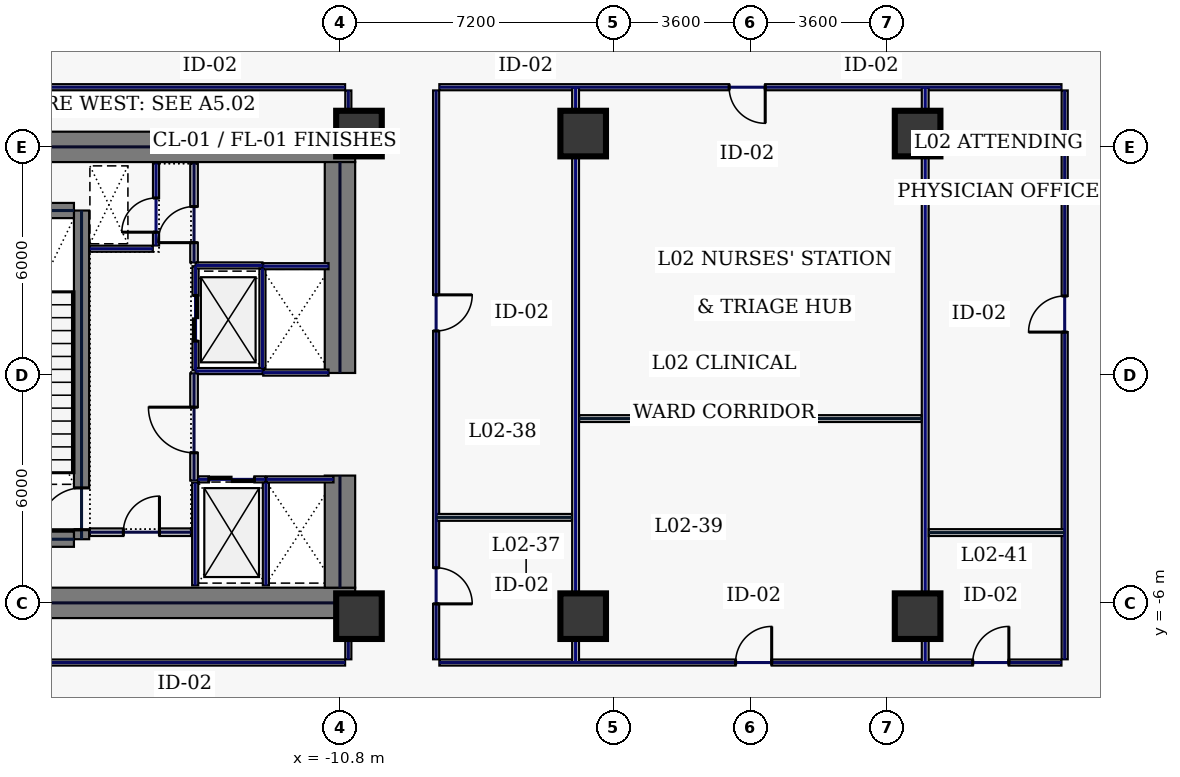
"""IFC4 building model, lengths in metres.
Left out: names, types, materials, properties, quantities, classifications, styles, units other than length and angle.
Written with IfcOpenShell. Run it as: python <this file> out.ifc"""

import sys

from ifc_helpers import new_model, si_unit, direction, frame, frame_2d, origin, origin_2d, place, context, subcontext, project, spatial, rectangle, hollow_rectangle, extrude, element, fill, save


model = new_model("IFC4")
c1 = context("Model", 3, precision=1e-05, world=origin(), true_north=direction((0.0, 1.0)))
c2 = subcontext(c1, "Body", "Model", "MODEL_VIEW")
j1 = project(units=[si_unit("LENGTHUNIT", "METRE"), si_unit("PLANEANGLEUNIT", "RADIAN")], contexts=[c1])
p1 = place(None, origin())
s1 = spatial("IfcSite", under=j1, at=p1, CompositionType="ELEMENT")
p2 = place(p1, origin())
s2 = spatial("IfcBuilding", under=s1, at=p2, CompositionType="ELEMENT")
p3 = place(p2, frame((0.0, 0.0, 13.4)))
s3 = spatial("IfcBuildingStorey", under=s2, at=p3, CompositionType="ELEMENT", Elevation=13.4)
for number, where, z_axis, x_axis in (
    (1, (-22.0, 6.0, 0.0), (0.0, 0.0, 1.0), (1.0, 0.0, 0.0)),
    (2, (-22.0, -6.0, 0.0), (0.0, 0.0, 1.0), (1.0, 0.0, 0.0)),
):
    element("IfcWall", number, at=place(p3, frame(where, z_axis=z_axis, x_axis=x_axis)), inside=s3, PredefinedType="SHEAR", context=c2, shape_type="SweptSolid", body=[
        extrude(rectangle(XDim=11.6, YDim=0.8, at=frame_2d((5.8, 0.0))), origin(), (0.0, 0.0, 1.0), 4.7),
    ])
p4 = place(p3, frame((-10.8, -5.6, 0.0), z_axis=(0.0, 0.0, 1.0), x_axis=(0.0, 1.0, 0.0)))
e3 = element("IfcWall", 3, at=p4, inside=s3, PredefinedType="SHEAR", context=c2, shape_type="SweptSolid", body=[
    extrude(rectangle(XDim=2.95, YDim=0.8, at=frame_2d((1.475, 0.0))), origin(), (0.0, 0.0, 1.0), 4.7),
])
p5 = place(p3, frame((-10.8, 0.05, 0.0), z_axis=(0.0, 0.0, 1.0), x_axis=(0.0, 1.0, 0.0)))
e4 = element("IfcWall", 4, at=p5, inside=s3, PredefinedType="SHEAR", context=c2, shape_type="SweptSolid", body=[
    extrude(rectangle(XDim=5.55, YDim=0.8, at=frame_2d((2.775, 0.0))), origin(), (0.0, 0.0, 1.0), 4.7),
])
p6 = place(p3, frame((-17.6, -4.325, 0.0), z_axis=(0.0, 0.0, 1.0), x_axis=(0.0, 1.0, 0.0)))
e5 = element("IfcWall", 5, at=p6, inside=s3, PredefinedType="SHEAR", context=c2, shape_type="SweptSolid", body=[
    extrude(rectangle(XDim=8.65, YDim=0.4, at=frame_2d((4.325, 0.0))), origin(), (0.0, 0.0, 1.0), 4.7),
])
p7 = place(p6, frame((0.25, 0.0, 0.0)))
e6 = element("IfcOpeningElement", 6, at=p7, cuts=e5, PredefinedType="OPENING", context=c2, shape_type="SweptSolid", body=[
    extrude(rectangle(XDim=1.1, YDim=2.2, at=frame_2d((0.55, 1.1))), frame((0.0, 0.21, 0.0), z_axis=(0.0, -1.0, 0.0), x_axis=(1.0, 0.0, 0.0)), (0.0, 0.0, 1.0), 0.42),
])
for number, where, z_axis, x_axis in (
    (7, (-21.2, -4.325, 0.0), (0.0, 0.0, 1.0), (1.0, 0.0, 0.0)),
    (8, (-21.2, 4.325, 0.0), (0.0, 0.0, 1.0), (1.0, 0.0, 0.0)),
):
    element("IfcWall", number, at=place(p3, frame(where, z_axis=z_axis, x_axis=x_axis)), inside=s3, PredefinedType="SHEAR", context=c2, shape_type="SweptSolid", body=[
        extrude(rectangle(XDim=3.4, YDim=0.4, at=frame_2d((1.7, 0.0))), origin(), (0.0, 0.0, 1.0), 4.7),
    ])
for number, where, z_axis, x_axis in (
    (9, (-10.3, -6.35, 0.0), (0.0, 0.0, 1.0), (1.0, 0.0, 0.0)),
    (10, (-10.3, 6.35, 0.0), (0.0, 0.0, 1.0), (1.0, 0.0, 0.0)),
    (11, (-4.4, -6.35, 0.0), (0.0, 0.0, 1.0), (1.0, 0.0, 0.0)),
    (12, (4.4, -6.35, 0.0), (0.0, 0.0, 1.0), (1.0, 0.0, 0.0)),
    (13, (-4.4, 6.35, 0.0), (0.0, 0.0, 1.0), (1.0, 0.0, 0.0)),
    (14, (4.4, 6.35, 0.0), (0.0, 0.0, 1.0), (1.0, 0.0, 0.0)),
):
    element("IfcColumn", number, at=place(p3, frame(where, z_axis=z_axis, x_axis=x_axis)), inside=s3, PredefinedType="COLUMN", context=c2, shape_type="SweptSolid", body=[
        extrude(hollow_rectangle(XDim=1.2, YDim=1.2, WallThickness=0.05, at=origin_2d()), origin(), (0.0, 0.0, 1.0), 4.7),
    ])
p8 = place(p3, frame((-14.6, 0.12, 0.0), z_axis=(0.0, 0.0, 1.0), x_axis=(0.0, 1.0, 0.0)))
e15 = element("IfcWall", 15, at=p8, inside=s3, PredefinedType="PARTITIONING", context=c2, shape_type="SweptSolid", body=[
    extrude(rectangle(XDim=2.74, YDim=0.16, at=frame_2d((1.37, 0.0))), origin(), (0.0, 0.0, 1.0), 4.7),
])
p9 = place(p8, frame((0.77, 0.0, 0.0)))
e16 = element("IfcOpeningElement", 16, at=p9, cuts=e15, PredefinedType="OPENING", context=c2, shape_type="SweptSolid", body=[
    extrude(rectangle(XDim=1.2, YDim=2.2, at=frame_2d((0.6, 1.1))), frame((0.0, 0.09, 0.0), z_axis=(0.0, -1.0, 0.0), x_axis=(1.0, 0.0, 0.0)), (0.0, 0.0, 1.0), 0.18),
])
for number, where, z_axis, x_axis in (
    (17, (-14.6, 0.1, 0.0), (0.0, 0.0, 1.0), (1.0, 0.0, 0.0)),
    (18, (-14.6, 2.88, 0.0), (0.0, 0.0, 1.0), (1.0, 0.0, 0.0)),
):
    element("IfcWall", number, at=place(p3, frame(where, z_axis=z_axis, x_axis=x_axis)), inside=s3, PredefinedType="PARTITIONING", context=c2, shape_type="SweptSolid", body=[
        extrude(rectangle(XDim=1.76, YDim=0.16, at=frame_2d((0.88, 0.0))), origin(), (0.0, 0.0, 1.0), 4.7),
    ])
p10 = place(p3, frame((-12.84, 0.18, 0.0), z_axis=(0.0, 0.0, 1.0), x_axis=(0.0, 1.0, 0.0)))
e19 = element("IfcWall", 19, at=p10, inside=s3, PredefinedType="PARTITIONING", context=c2, shape_type="SweptSolid", body=[
    extrude(rectangle(XDim=2.62, YDim=0.16, at=frame_2d((1.31, 0.0))), origin(), (0.0, 0.0, 1.0), 4.7),
])
p11 = place(p3, frame((-14.53, -2.75, 0.0), z_axis=(0.0, 0.0, 1.0), x_axis=(1.0, 0.0, 0.0)))
e20 = element("IfcWall", 20, at=p11, inside=s3, PredefinedType="PARTITIONING", context=c2, shape_type="SweptSolid", body=[
    extrude(rectangle(XDim=1.76, YDim=0.16, at=frame_2d((0.88, 0.0))), origin(), (0.0, 0.0, 1.0), 4.7),
])
p12 = place(p11, frame((0.28, 0.0, 0.0)))
e21 = element("IfcOpeningElement", 21, at=p12, cuts=e20, PredefinedType="OPENING", context=c2, shape_type="SweptSolid", body=[
    extrude(rectangle(XDim=1.2, YDim=2.2, at=frame_2d((0.6, 1.1))), frame((0.0, 0.09, 0.0), z_axis=(0.0, -1.0, 0.0), x_axis=(1.0, 0.0, 0.0)), (0.0, 0.0, 1.0), 0.18),
])
for number, where, z_axis, x_axis in (
    (22, (-12.75, -5.54, 0.0), (0.0, 0.0, 1.0), (0.0, 1.0, 0.0)),
    (23, (-14.61, -5.54, 0.0), (0.0, 0.0, 1.0), (0.0, 1.0, 0.0)),
):
    element("IfcWall", number, at=place(p3, frame(where, z_axis=z_axis, x_axis=x_axis)), inside=s3, PredefinedType="PARTITIONING", context=c2, shape_type="SweptSolid", body=[
        extrude(rectangle(XDim=2.7, YDim=0.16, at=frame_2d((1.35, 0.0))), origin(), (0.0, 0.0, 1.0), 4.7),
    ])
p13 = place(p3, frame((-12.73, -2.75, 0.0), z_axis=(0.0, 0.0, 1.0), x_axis=(1.0, 0.0, 0.0)))
e24 = element("IfcWall", 24, at=p13, inside=s3, PredefinedType="PARTITIONING", context=c2, shape_type="SweptSolid", body=[
    extrude(rectangle(XDim=1.76, YDim=0.16, at=frame_2d((0.88, 0.0))), origin(), (0.0, 0.0, 1.0), 4.7),
])
for number, where, z_axis, x_axis in (
    (25, (-12.82, 0.06, 0.0), (0.0, 0.0, 1.0), (1.0, 0.0, 0.0)),
    (26, (-12.82, 2.86, 0.0), (0.0, 0.0, 1.0), (1.0, 0.0, 0.0)),
):
    element("IfcWall", number, at=place(p3, frame(where, z_axis=z_axis, x_axis=x_axis)), inside=s3, PredefinedType="PARTITIONING", context=c2, shape_type="SweptSolid", body=[
        extrude(rectangle(XDim=1.72, YDim=0.16, at=frame_2d((0.86, 0.0))), origin(), (0.0, 0.0, 1.0), 4.7),
    ])
p14 = place(p3, frame((-15.64, 3.405, 0.0), z_axis=(0.0, 0.0, 1.0), x_axis=(0.0, 1.0, 0.0)))
e27 = element("IfcWall", 27, at=p14, inside=s3, PredefinedType="PARTITIONING", context=c2, shape_type="SweptSolid", body=[
    extrude(rectangle(XDim=2.155, YDim=0.16, at=frame_2d((1.078, 0.0))), origin(), (0.0, 0.0, 1.0), 4.7),
])
p15 = place(p14, frame((0.35, 0.0, 0.0)))
e28 = element("IfcOpeningElement", 28, at=p15, cuts=e27, PredefinedType="OPENING", context=c2, shape_type="SweptSolid", body=[
    extrude(rectangle(XDim=0.9, YDim=2.2, at=frame_2d((0.45, 1.1))), frame((0.0, 0.09, 0.0), z_axis=(0.0, -1.0, 0.0), x_axis=(1.0, 0.0, 0.0)), (0.0, 0.0, 1.0), 0.18),
])
p16 = place(p3, frame((-17.38, 3.32, 0.0), z_axis=(0.0, 0.0, 1.0), x_axis=(1.0, 0.0, 0.0)))
e29 = element("IfcWall", 29, at=p16, inside=s3, PredefinedType="PARTITIONING", context=c2, shape_type="SweptSolid", body=[
    extrude(rectangle(XDim=1.655, YDim=0.16, at=frame_2d((0.827, 0.0))), origin(), (0.0, 0.0, 1.0), 4.7),
])
p17 = place(p3, frame((-17.38, -4.14, 0.0), z_axis=(0.0, 0.0, 1.0), x_axis=(1.0, 0.0, 0.0)))
e30 = element("IfcWall", 30, at=p17, inside=s3, PredefinedType="SOLIDWALL", context=c2, shape_type="SweptSolid", body=[
    extrude(rectangle(XDim=2.66, YDim=0.2, at=frame_2d((1.33, 0.0))), origin(), (0.0, 0.0, 1.0), 4.7),
])
p18 = place(p17, frame((0.88, 0.0, 0.0)))
e31 = element("IfcOpeningElement", 31, at=p18, cuts=e30, PredefinedType="OPENING", context=c2, shape_type="SweptSolid", body=[
    extrude(rectangle(XDim=0.95, YDim=2.2, at=frame_2d((0.475, 1.1))), frame((0.0, 0.11, 0.0), z_axis=(0.0, -1.0, 0.0), x_axis=(1.0, 0.0, 0.0)), (0.0, 0.0, 1.0), 0.22),
])
p19 = place(p3, frame((-14.64, 2.96, 0.0), z_axis=(0.0, 0.0, 1.0), x_axis=(0.0, 1.0, 0.0)))
e32 = element("IfcWall", 32, at=p19, inside=s3, PredefinedType="SOLIDWALL", context=c2, shape_type="SweptSolid", body=[
    extrude(rectangle(XDim=2.6, YDim=0.2, at=frame_2d((1.3, 0.0))), origin(), (0.0, 0.0, 1.0), 4.7),
])
p20 = place(p19, frame((0.52, 0.0, 0.0)))
e33 = element("IfcOpeningElement", 33, at=p20, cuts=e32, PredefinedType="OPENING", context=c2, shape_type="SweptSolid", body=[
    extrude(rectangle(XDim=0.95, YDim=2.2, at=frame_2d((0.475, 1.1))), frame((0.0, 0.11, 0.0), z_axis=(0.0, -1.0, 0.0), x_axis=(1.0, 0.0, 0.0)), (0.0, 0.0, 1.0), 0.22),
])
p21 = place(p3, frame((-14.64, -2.78, 0.0), z_axis=(0.0, 0.0, 1.0), x_axis=(0.0, 1.0, 0.0)))
e34 = element("IfcWall", 34, at=p21, inside=s3, PredefinedType="SOLIDWALL", context=c2, shape_type="SweptSolid", body=[
    extrude(rectangle(XDim=2.82, YDim=0.2, at=frame_2d((1.41, 0.0))), origin(), (0.0, 0.0, 1.0), 4.7),
])
p22 = place(p21, frame((0.73, 0.0, 0.0)))
e35 = element("IfcOpeningElement", 35, at=p22, cuts=e34, PredefinedType="OPENING", context=c2, shape_type="SweptSolid", body=[
    extrude(rectangle(XDim=1.2, YDim=2.2, at=frame_2d((0.6, 1.1))), frame((0.0, 0.11, 0.0), z_axis=(0.0, -1.0, 0.0), x_axis=(1.0, 0.0, 0.0)), (0.0, 0.0, 1.0), 0.22),
])
p23 = place(p3, frame((8.185, 7.57, 0.0), z_axis=(0.0, 0.0, 1.0), x_axis=(-1.0, 0.0, 0.0)))
e36 = element("IfcWall", 36, at=p23, inside=s3, PredefinedType="PARTITIONING", context=c2, shape_type="SweptSolid", body=[
    extrude(rectangle(XDim=16.37, YDim=0.16, at=frame_2d((8.185, 0.0))), origin(), (0.0, 0.0, 1.0), 4.7),
])
p24 = place(p23, frame((7.795, 0.0, 0.0)))
e37 = element("IfcOpeningElement", 37, at=p24, cuts=e36, PredefinedType="OPENING", context=c2, shape_type="SweptSolid", body=[
    extrude(rectangle(XDim=0.95, YDim=2.2, at=frame_2d((0.475, 1.1))), frame((0.0, 0.09, 0.0), z_axis=(0.0, -1.0, 0.0), x_axis=(1.0, 0.0, 0.0)), (0.0, 0.0, 1.0), 0.18),
])
p25 = place(p3, frame((-8.27, 7.485, 0.0), z_axis=(0.0, 0.0, 1.0), x_axis=(0.0, -1.0, 0.0)))
e38 = element("IfcWall", 38, at=p25, inside=s3, PredefinedType="PARTITIONING", context=c2, shape_type="SweptSolid", body=[
    extrude(rectangle(XDim=14.97, YDim=0.16, at=frame_2d((7.485, 0.0))), origin(), (0.0, 0.0, 1.0), 4.7),
])
p26 = place(p25, frame((12.561, 0.0, 0.0)))
e39 = element("IfcOpeningElement", 39, at=p26, cuts=e38, PredefinedType="OPENING", context=c2, shape_type="SweptSolid", body=[
    extrude(rectangle(XDim=0.95, YDim=2.2, at=frame_2d((0.475, 1.1))), frame((0.0, 0.09, 0.0), z_axis=(0.0, -1.0, 0.0), x_axis=(1.0, 0.0, 0.0)), (0.0, 0.0, 1.0), 0.18),
])
p27 = place(p25, frame((5.379, 0.0, 0.0)))
e40 = element("IfcOpeningElement", 40, at=p27, cuts=e38, PredefinedType="OPENING", context=c2, shape_type="SweptSolid", body=[
    extrude(rectangle(XDim=0.95, YDim=2.2, at=frame_2d((0.475, 1.1))), frame((0.0, 0.09, 0.0), z_axis=(0.0, -1.0, 0.0), x_axis=(1.0, 0.0, 0.0)), (0.0, 0.0, 1.0), 0.18),
])
p28 = place(p3, frame((-8.185, -7.57, 0.0), z_axis=(0.0, 0.0, 1.0), x_axis=(1.0, 0.0, 0.0)))
e41 = element("IfcWall", 41, at=p28, inside=s3, PredefinedType="PARTITIONING", context=c2, shape_type="SweptSolid", body=[
    extrude(rectangle(XDim=16.37, YDim=0.16, at=frame_2d((8.185, 0.0))), origin(), (0.0, 0.0, 1.0), 4.7),
])
p29 = place(p28, frame((7.795, 0.0, 0.0)))
e42 = element("IfcOpeningElement", 42, at=p29, cuts=e41, PredefinedType="OPENING", context=c2, shape_type="SweptSolid", body=[
    extrude(rectangle(XDim=0.95, YDim=2.2, at=frame_2d((0.475, 1.1))), frame((0.0, 0.09, 0.0), z_axis=(0.0, -1.0, 0.0), x_axis=(1.0, 0.0, 0.0)), (0.0, 0.0, 1.0), 0.18),
])
p30 = place(p28, frame((14.036, 0.0, 0.0)))
e43 = element("IfcOpeningElement", 43, at=p30, cuts=e41, PredefinedType="OPENING", context=c2, shape_type="SweptSolid", body=[
    extrude(rectangle(XDim=0.95, YDim=2.2, at=frame_2d((0.475, 1.1))), frame((0.0, 0.09, 0.0), z_axis=(0.0, -1.0, 0.0), x_axis=(1.0, 0.0, 0.0)), (0.0, 0.0, 1.0), 0.18),
])
p31 = place(p3, frame((8.27, -7.485, 0.0), z_axis=(0.0, 0.0, 1.0), x_axis=(0.0, 1.0, 0.0)))
e44 = element("IfcWall", 44, at=p31, inside=s3, PredefinedType="PARTITIONING", context=c2, shape_type="SweptSolid", body=[
    extrude(rectangle(XDim=14.97, YDim=0.16, at=frame_2d((7.485, 0.0))), origin(), (0.0, 0.0, 1.0), 4.7),
])
p32 = place(p31, frame((8.611, 0.0, 0.0)))
e45 = element("IfcOpeningElement", 45, at=p32, cuts=e44, PredefinedType="OPENING", context=c2, shape_type="SweptSolid", body=[
    extrude(rectangle(XDim=0.95, YDim=2.2, at=frame_2d((0.475, 1.1))), frame((0.0, 0.09, 0.0), z_axis=(0.0, -1.0, 0.0), x_axis=(1.0, 0.0, 0.0)), (0.0, 0.0, 1.0), 0.18),
])
for number, where, z_axis, x_axis in (
    (46, (-10.58, -7.485, 0.0), (0.0, 0.0, 1.0), (0.0, 1.0, 0.0)),
    (47, (-10.58, 6.42, 0.0), (0.0, 0.0, 1.0), (0.0, 1.0, 0.0)),
):
    element("IfcWall", number, at=place(p3, frame(where, z_axis=z_axis, x_axis=x_axis)), inside=s3, PredefinedType="PARTITIONING", context=c2, shape_type="SweptSolid", body=[
        extrude(rectangle(XDim=1.065, YDim=0.16, at=frame_2d((0.533, 0.0))), origin(), (0.0, 0.0, 1.0), 4.7),
    ])
for number, where, z_axis, x_axis in (
    (48, (-10.665, 7.57, 0.0), (0.0, 0.0, 1.0), (-1.0, 0.0, 0.0)),
    (49, (-27.185, -7.57, 0.0), (0.0, 0.0, 1.0), (1.0, 0.0, 0.0)),
):
    element("IfcWall", number, at=place(p3, frame(where, z_axis=z_axis, x_axis=x_axis)), inside=s3, PredefinedType="PARTITIONING", context=c2, shape_type="SweptSolid", body=[
        extrude(rectangle(XDim=16.52, YDim=0.16, at=frame_2d((8.26, 0.0))), origin(), (0.0, 0.0, 1.0), 4.7),
    ])
for number, where, z_axis, x_axis in (
    (50, (-4.6, -7.565, 0.0), (0.0, 0.0, 1.0), (0.0, 1.0, 0.0)),
    (51, (4.6, -7.565, 0.0), (0.0, 0.0, 1.0), (0.0, 1.0, 0.0)),
):
    element("IfcWall", number, at=place(p3, frame(where, z_axis=z_axis, x_axis=x_axis)), inside=s3, PredefinedType="PARTITIONING", context=c2, shape_type="SweptSolid", body=[
        extrude(rectangle(XDim=15.13, YDim=0.18, at=frame_2d((7.565, 0.0))), origin(), (0.0, 0.0, 1.0), 3.895),
    ])
p33 = place(p3, frame((-4.505, -1.15, 0.0), z_axis=(0.0, 0.0, 1.0), x_axis=(1.0, 0.0, 0.0)))
e52 = element("IfcWall", 52, at=p33, inside=s3, PredefinedType="PARTITIONING", context=c2, shape_type="SweptSolid", body=[
    extrude(rectangle(XDim=9.01, YDim=0.18, at=frame_2d((4.505, 0.0))), origin(), (0.0, 0.0, 1.0), 4.7),
])
for number, where, z_axis, x_axis in (
    (53, (-8.265, -3.75, 0.0), (0.0, 0.0, 1.0), (1.0, 0.0, 0.0)),
    (54, (4.695, -4.15, 0.0), (0.0, 0.0, 1.0), (1.0, 0.0, 0.0)),
):
    element("IfcWall", number, at=place(p3, frame(where, z_axis=z_axis, x_axis=x_axis)), inside=s3, PredefinedType="PARTITIONING", context=c2, shape_type="SweptSolid", body=[
        extrude(rectangle(XDim=3.57, YDim=0.18, at=frame_2d((1.785, 0.0))), origin(), (0.0, 0.0, 1.0), 4.7),
    ])
p34 = place(p7, origin())
e55 = element("IfcDoor", 55, at=p34, inside=s3, OperationType="SINGLE_SWING_LEFT", PredefinedType="DOOR", context=c2, shape_type="SweptSolid", body=[
    extrude(rectangle(XDim=1.1, YDim=2.2, at=frame_2d((0.55, 1.1))), frame((0.0, 0.025, 0.0), z_axis=(0.0, -1.0, 0.0), x_axis=(1.0, 0.0, 0.0)), (0.0, 0.0, 1.0), 0.05),
])
fill(e6, e55)
p35 = place(p9, origin())
e56 = element("IfcDoor", 56, at=p35, inside=s3, OperationType="SLIDING_TO_LEFT", PredefinedType="DOOR", context=c2, shape_type="SweptSolid", body=[
    extrude(rectangle(XDim=1.2, YDim=2.2, at=frame_2d((0.6, 1.1))), frame((0.0, 0.025, 0.0), z_axis=(0.0, -1.0, 0.0), x_axis=(1.0, 0.0, 0.0)), (0.0, 0.0, 1.0), 0.05),
])
fill(e16, e56)
p36 = place(p12, origin())
e57 = element("IfcDoor", 57, at=p36, inside=s3, OperationType="SLIDING_TO_LEFT", PredefinedType="DOOR", context=c2, shape_type="SweptSolid", body=[
    extrude(rectangle(XDim=1.2, YDim=2.2, at=frame_2d((0.6, 1.1))), frame((0.0, 0.025, 0.0), z_axis=(0.0, -1.0, 0.0), x_axis=(1.0, 0.0, 0.0)), (0.0, 0.0, 1.0), 0.05),
])
fill(e21, e57)
p37 = place(p15, origin())
e58 = element("IfcDoor", 58, at=p37, inside=s3, OperationType="SINGLE_SWING_LEFT", PredefinedType="DOOR", context=c2, shape_type="SweptSolid", body=[
    extrude(rectangle(XDim=0.9, YDim=2.2, at=frame_2d((0.45, 1.1))), frame((0.0, 0.025, 0.0), z_axis=(0.0, -1.0, 0.0), x_axis=(1.0, 0.0, 0.0)), (0.0, 0.0, 1.0), 0.05),
])
fill(e28, e58)
p38 = place(p18, origin())
e59 = element("IfcDoor", 59, at=p38, inside=s3, OperationType="SINGLE_SWING_RIGHT", PredefinedType="DOOR", context=c2, shape_type="SweptSolid", body=[
    extrude(rectangle(XDim=0.95, YDim=2.2, at=frame_2d((0.475, 1.1))), frame((0.0, 0.025, 0.0), z_axis=(0.0, -1.0, 0.0), x_axis=(1.0, 0.0, 0.0)), (0.0, 0.0, 1.0), 0.05),
])
fill(e31, e59)
p39 = place(p20, origin())
e60 = element("IfcDoor", 60, at=p39, inside=s3, OperationType="SINGLE_SWING_LEFT", PredefinedType="DOOR", context=c2, shape_type="SweptSolid", body=[
    extrude(rectangle(XDim=0.95, YDim=2.2, at=frame_2d((0.475, 1.1))), frame((0.0, 0.025, 0.0), z_axis=(0.0, -1.0, 0.0), x_axis=(1.0, 0.0, 0.0)), (0.0, 0.0, 1.0), 0.05),
])
fill(e33, e60)
p40 = place(p22, origin())
e61 = element("IfcDoor", 61, at=p40, inside=s3, OperationType="SINGLE_SWING_RIGHT", PredefinedType="DOOR", context=c2, shape_type="SweptSolid", body=[
    extrude(rectangle(XDim=1.2, YDim=2.2, at=frame_2d((0.6, 1.1))), frame((0.0, 0.025, 0.0), z_axis=(0.0, -1.0, 0.0), x_axis=(1.0, 0.0, 0.0)), (0.0, 0.0, 1.0), 0.05),
])
fill(e35, e61)
p41 = place(p26, origin())
e62 = element("IfcDoor", 62, at=p41, inside=s3, OperationType="SINGLE_SWING_RIGHT", PredefinedType="DOOR", context=c2, shape_type="SweptSolid", body=[
    extrude(rectangle(XDim=0.95, YDim=2.2, at=frame_2d((0.475, 1.1))), frame((0.0, 0.025, 0.0), z_axis=(0.0, -1.0, 0.0), x_axis=(1.0, 0.0, 0.0)), (0.0, 0.0, 1.0), 0.05),
])
fill(e39, e62)
p42 = place(p27, origin())
e63 = element("IfcDoor", 63, at=p42, inside=s3, OperationType="SINGLE_SWING_LEFT", PredefinedType="DOOR", context=c2, shape_type="SweptSolid", body=[
    extrude(rectangle(XDim=0.95, YDim=2.2, at=frame_2d((0.475, 1.1))), frame((0.0, 0.025, 0.0), z_axis=(0.0, -1.0, 0.0), x_axis=(1.0, 0.0, 0.0)), (0.0, 0.0, 1.0), 0.05),
])
fill(e40, e63)
p43 = place(p29, origin())
e64 = element("IfcDoor", 64, at=p43, inside=s3, OperationType="SINGLE_SWING_RIGHT", PredefinedType="DOOR", context=c2, shape_type="SweptSolid", body=[
    extrude(rectangle(XDim=0.95, YDim=2.2, at=frame_2d((0.475, 1.1))), frame((0.0, 0.025, 0.0), z_axis=(0.0, -1.0, 0.0), x_axis=(1.0, 0.0, 0.0)), (0.0, 0.0, 1.0), 0.05),
])
fill(e42, e64)
p44 = place(p24, origin())
e65 = element("IfcDoor", 65, at=p44, inside=s3, OperationType="SINGLE_SWING_LEFT", PredefinedType="DOOR", context=c2, shape_type="SweptSolid", body=[
    extrude(rectangle(XDim=0.95, YDim=2.2, at=frame_2d((0.475, 1.1))), frame((0.0, 0.025, 0.0), z_axis=(0.0, -1.0, 0.0), x_axis=(1.0, 0.0, 0.0)), (0.0, 0.0, 1.0), 0.05),
])
fill(e37, e65)
p45 = place(p30, origin())
e66 = element("IfcDoor", 66, at=p45, inside=s3, OperationType="SINGLE_SWING_RIGHT", PredefinedType="DOOR", context=c2, shape_type="SweptSolid", body=[
    extrude(rectangle(XDim=0.95, YDim=2.2, at=frame_2d((0.475, 1.1))), frame((0.0, 0.025, 0.0), z_axis=(0.0, -1.0, 0.0), x_axis=(1.0, 0.0, 0.0)), (0.0, 0.0, 1.0), 0.05),
])
fill(e43, e66)
p46 = place(p32, origin())
e67 = element("IfcDoor", 67, at=p46, inside=s3, OperationType="SINGLE_SWING_LEFT", PredefinedType="DOOR", context=c2, shape_type="SweptSolid", body=[
    extrude(rectangle(XDim=0.95, YDim=2.2, at=frame_2d((0.475, 1.1))), frame((0.0, 0.025, 0.0), z_axis=(0.0, -1.0, 0.0), x_axis=(1.0, 0.0, 0.0)), (0.0, 0.0, 1.0), 0.05),
])
fill(e45, e67)
save(model, sys.argv[1])
